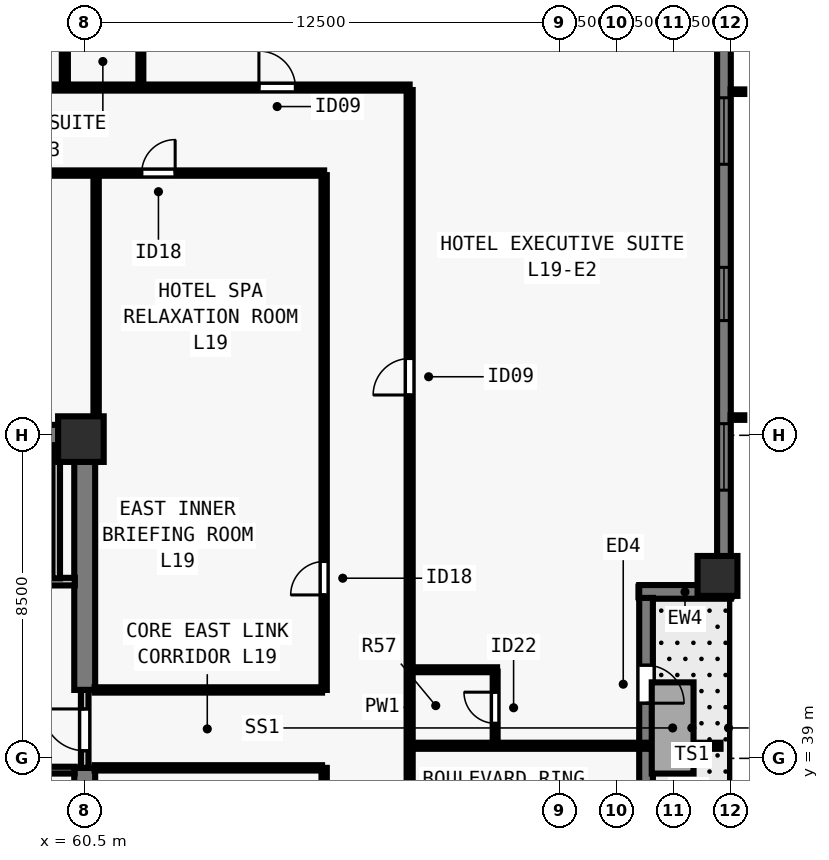
"""IFC4 building model, lengths in metres.
Left out: names, types, materials, properties, quantities, classifications, styles, units other than length and angle.
Written with IfcOpenShell. Run it as: python <this file> out.ifc"""

import sys

from ifc_helpers import new_model, si_unit, direction, frame, frame_2d, origin, origin_2d, place, context, subcontext, project, spatial, rectangle, extrude, element, fill, save


model = new_model("IFC4")
c1 = context("Model", 3, precision=1e-05, world=origin(), true_north=direction((0.0, 1.0)))
c2 = subcontext(c1, "Body", "Model", "MODEL_VIEW")
j1 = project(units=[si_unit("LENGTHUNIT", "METRE"), si_unit("PLANEANGLEUNIT", "RADIAN")], contexts=[c1])
p1 = place(None, origin())
s1 = spatial("IfcSite", under=j1, at=p1, CompositionType="ELEMENT")
p2 = place(p1, origin())
s2 = spatial("IfcBuilding", under=s1, at=p2, CompositionType="ELEMENT")
p3 = place(p2, frame((0.0, 0.0, 72.5)))
s3 = spatial("IfcBuildingStorey", under=s2, at=p3, CompositionType="ELEMENT", Elevation=72.5)
p4 = place(p3, frame((60.4, 47.4, 0.0), z_axis=(0.0, 0.0, 1.0), x_axis=(1.0, 0.0, 0.0)))
e1 = element("IfcColumn", 1, at=p4, inside=s3, PredefinedType="COLUMN", context=c2, shape_type="SweptSolid", body=[
    extrude(rectangle(XDim=1.2, YDim=1.2, at=origin_2d()), origin(), (0.0, 0.0, 1.0), 3.5),
])
p5 = place(p3, frame((77.15, 43.8, 0.0), z_axis=(0.0, 0.0, 1.0), x_axis=(0.0, 1.0, 0.0)))
e2 = element("IfcColumn", 2, at=p5, inside=s3, PredefinedType="COLUMN", context=c2, shape_type="SweptSolid", body=[
    extrude(rectangle(XDim=1.05, YDim=1.05, at=origin_2d()), origin(), (0.0, 0.0, 1.0), 3.5),
])
p6 = place(p3, frame((77.32, 61.5, 0.0), z_axis=(0.0, 0.0, 1.0), x_axis=(0.0, -1.0, 0.0)))
e3 = element("IfcWall", 3, at=p6, inside=s3, PredefinedType="SOLIDWALL", context=c2, shape_type="SweptSolid", body=[
    extrude(rectangle(XDim=17.962, YDim=0.36, at=frame_2d((8.981, 0.0))), origin(), (0.0, 0.0, 1.0), 3.28),
])
p7 = place(p6, frame((5.119, 0.0, 0.8)))
e4 = element("IfcOpeningElement", 4, at=p7, cuts=e3, PredefinedType="OPENING", context=c2, shape_type="SweptSolid", body=[
    extrude(rectangle(XDim=1.75, YDim=1.544, at=frame_2d((0.875, 0.772))), frame((0.0, 0.19, 0.0), z_axis=(0.0, -1.0, 0.0), x_axis=(1.0, 0.0, 0.0)), (0.0, 0.0, 1.0), 0.38),
])
p8 = place(p6, frame((9.581, 0.0, 0.8)))
e5 = element("IfcOpeningElement", 5, at=p8, cuts=e3, PredefinedType="OPENING", context=c2, shape_type="SweptSolid", body=[
    extrude(rectangle(XDim=1.4, YDim=1.544, at=frame_2d((0.7, 0.772))), frame((0.0, 0.19, 0.0), z_axis=(0.0, -1.0, 0.0), x_axis=(1.0, 0.0, 0.0)), (0.0, 0.0, 1.0), 0.38),
])
p9 = place(p6, frame((13.693, 0.0, 0.8)))
e6 = element("IfcOpeningElement", 6, at=p9, cuts=e3, PredefinedType="OPENING", context=c2, shape_type="SweptSolid", body=[
    extrude(rectangle(XDim=1.75, YDim=1.544, at=frame_2d((0.875, 0.772))), frame((0.0, 0.19, 0.0), z_axis=(0.0, -1.0, 0.0), x_axis=(1.0, 0.0, 0.0)), (0.0, 0.0, 1.0), 0.38),
])
p10 = place(p3, frame((77.5, 43.38, 0.0), z_axis=(0.0, 0.0, 1.0), x_axis=(-1.0, 0.0, 0.0)))
e7 = element("IfcWall", 7, at=p10, inside=s3, PredefinedType="SOLIDWALL", context=c2, shape_type="SweptSolid", body=[
    extrude(rectangle(XDim=2.41, YDim=0.36, at=frame_2d((1.205, 0.0))), origin(), (0.0, 0.0, 1.0), 3.28),
])
p11 = place(p3, frame((75.27, 43.222, 0.0), z_axis=(0.0, 0.0, 1.0), x_axis=(0.0, -1.0, 0.0)))
e8 = element("IfcWall", 8, at=p11, inside=s3, PredefinedType="SOLIDWALL", context=c2, shape_type="SweptSolid", body=[
    extrude(rectangle(XDim=7.182, YDim=0.36, at=frame_2d((3.591, 0.0))), origin(), (0.0, 0.0, 1.0), 3.28),
])
p12 = place(p11, frame((1.77, 0.0, 0.0)))
e9 = element("IfcOpeningElement", 9, at=p12, cuts=e8, PredefinedType="OPENING", context=c2, shape_type="SweptSolid", body=[
    extrude(rectangle(XDim=1.0, YDim=2.15, at=frame_2d((0.5, 1.075))), frame((0.0, 0.19, 0.0), z_axis=(0.0, -1.0, 0.0), x_axis=(1.0, 0.0, 0.0)), (0.0, 0.0, 1.0), 0.38),
])
p13 = place(p3, frame((43.225, 47.5, 0.0), z_axis=(0.0, 0.0, 1.0), x_axis=(1.0, 0.0, 0.0)))
e10 = element("IfcWall", 10, at=p13, inside=s3, PredefinedType="SHEAR", context=c2, shape_type="SweptSolid", body=[
    extrude(rectangle(XDim=17.55, YDim=0.55, at=frame_2d((8.775, 0.0))), origin(), (0.0, 0.0, 1.0), 3.28),
])
p14 = place(p3, frame((60.5, 30.765, 0.0), z_axis=(0.0, 0.0, 1.0), x_axis=(0.0, 1.0, 0.0)))
e11 = element("IfcWall", 11, at=p14, inside=s3, PredefinedType="SHEAR", context=c2, shape_type="SweptSolid", body=[
    extrude(rectangle(XDim=7.985, YDim=0.55, at=frame_2d((3.993, 0.0))), origin(), (0.0, 0.0, 1.0), 3.28),
])
p15 = place(p3, frame((60.5, 40.8, 0.0), z_axis=(0.0, 0.0, 1.0), x_axis=(0.0, 1.0, 0.0)))
e12 = element("IfcWall", 12, at=p15, inside=s3, PredefinedType="SHEAR", context=c2, shape_type="SweptSolid", body=[
    extrude(rectangle(XDim=6.435, YDim=0.55, at=frame_2d((3.218, 0.0))), origin(), (0.0, 0.0, 1.0), 3.28),
])
p16 = place(p3, frame((60.5, 38.75, 0.0), z_axis=(0.0, 0.0, 1.0), x_axis=(0.0, 1.0, 0.0)))
e13 = element("IfcWall", 13, at=p16, inside=s3, PredefinedType="SOLIDWALL", context=c2, shape_type="SweptSolid", body=[
    extrude(rectangle(XDim=2.05, YDim=0.2, at=frame_2d((1.025, 0.0))), origin(), (0.0, 0.0, 1.0), 3.28),
])
p17 = place(p16, frame((0.45, 0.0, 0.0)))
e14 = element("IfcOpeningElement", 14, at=p17, cuts=e13, PredefinedType="OPENING", context=c2, shape_type="SweptSolid", body=[
    extrude(rectangle(XDim=1.1, YDim=2.15, at=frame_2d((0.55, 1.075))), frame((0.0, 0.11, 0.0), z_axis=(0.0, -1.0, 0.0), x_axis=(1.0, 0.0, 0.0)), (0.0, 0.0, 1.0), 0.22),
])
p18 = place(p3, frame((56.735, 43.65, 0.0), z_axis=(0.0, 0.0, 1.0), x_axis=(1.0, 0.0, 0.0)))
e15 = element("IfcWall", 15, at=p18, inside=s3, PredefinedType="SOLIDWALL", context=c2, shape_type="SweptSolid", body=[
    extrude(rectangle(XDim=3.505, YDim=0.2, at=frame_2d((1.752, 0.0))), origin(), (0.0, 0.0, 1.0), 3.28),
])
p19 = place(p18, frame((1.295, 0.0, 0.0)))
e16 = element("IfcOpeningElement", 16, at=p19, cuts=e15, PredefinedType="OPENING", context=c2, shape_type="SweptSolid", body=[
    extrude(rectangle(XDim=1.1, YDim=2.2, at=frame_2d((0.55, 1.1))), frame((0.0, 0.11, 0.0), z_axis=(0.0, -1.0, 0.0), x_axis=(1.0, 0.0, 0.0)), (0.0, 0.0, 1.0), 0.22),
])
p20 = place(p3, frame((59.75, 43.735, 0.0), z_axis=(0.0, 0.0, 1.0), x_axis=(0.0, 1.0, 0.0)))
e17 = element("IfcWall", 17, at=p20, inside=s3, PredefinedType="SOLIDWALL", context=c2, shape_type="SweptSolid", body=[
    extrude(rectangle(XDim=3.505, YDim=0.2, at=frame_2d((1.752, 0.0))), origin(), (0.0, 0.0, 1.0), 3.28),
])
p21 = place(p3, frame((34.95, 56.65, 0.0), z_axis=(0.0, 0.0, 1.0), x_axis=(1.0, 0.0, 0.0)))
e18 = element("IfcWall", 18, at=p21, inside=s3, PredefinedType="PARTITIONING", context=c2, shape_type="SweptSolid", body=[
    extrude(rectangle(XDim=34.1, YDim=0.16, at=frame_2d((17.05, 0.0))), origin(), (0.0, 0.0, 1.0), 3.28),
])
p22 = place(p21, frame((4.166, 0.0, 0.0)))
e19 = element("IfcOpeningElement", 19, at=p22, cuts=e18, PredefinedType="OPENING", context=c2, shape_type="SweptSolid", body=[
    extrude(rectangle(XDim=0.96, YDim=2.15, at=frame_2d((0.48, 1.075))), frame((0.0, 0.09, 0.0), z_axis=(0.0, -1.0, 0.0), x_axis=(1.0, 0.0, 0.0)), (0.0, 0.0, 1.0), 0.18),
])
p23 = place(p21, frame((17.73, 0.0, 0.0)))
e20 = element("IfcOpeningElement", 20, at=p23, cuts=e18, PredefinedType="OPENING", context=c2, shape_type="SweptSolid", body=[
    extrude(rectangle(XDim=0.96, YDim=2.15, at=frame_2d((0.48, 1.075))), frame((0.0, 0.09, 0.0), z_axis=(0.0, -1.0, 0.0), x_axis=(1.0, 0.0, 0.0)), (0.0, 0.0, 1.0), 0.18),
])
p24 = place(p21, frame((30.134, 0.0, 0.0)))
e21 = element("IfcOpeningElement", 21, at=p24, cuts=e18, PredefinedType="OPENING", context=c2, shape_type="SweptSolid", body=[
    extrude(rectangle(XDim=0.96, YDim=2.15, at=frame_2d((0.48, 1.075))), frame((0.0, 0.09, 0.0), z_axis=(0.0, -1.0, 0.0), x_axis=(1.0, 0.0, 0.0)), (0.0, 0.0, 1.0), 0.18),
])
p25 = place(p3, frame((69.05, 21.415, 0.0), z_axis=(0.0, 0.0, 1.0), x_axis=(0.0, 1.0, 0.0)))
e22 = element("IfcWall", 22, at=p25, inside=s3, PredefinedType="PARTITIONING", context=c2, shape_type="SweptSolid", body=[
    extrude(rectangle(XDim=35.17, YDim=0.16, at=frame_2d((17.585, 0.0))), origin(), (0.0, 0.0, 1.0), 3.28),
])
p26 = place(p25, frame((9.746, 0.0, 0.0)))
e23 = element("IfcOpeningElement", 23, at=p26, cuts=e22, PredefinedType="OPENING", context=c2, shape_type="SweptSolid", body=[
    extrude(rectangle(XDim=0.96, YDim=2.15, at=frame_2d((0.48, 1.075))), frame((0.0, 0.09, 0.0), z_axis=(0.0, -1.0, 0.0), x_axis=(1.0, 0.0, 0.0)), (0.0, 0.0, 1.0), 0.18),
])
p27 = place(p25, frame((27.146, 0.0, 0.0)))
e24 = element("IfcOpeningElement", 24, at=p27, cuts=e22, PredefinedType="OPENING", context=c2, shape_type="SweptSolid", body=[
    extrude(rectangle(XDim=0.96, YDim=2.15, at=frame_2d((0.48, 1.075))), frame((0.0, 0.09, 0.0), z_axis=(0.0, -1.0, 0.0), x_axis=(1.0, 0.0, 0.0)), (0.0, 0.0, 1.0), 0.18),
])
p28 = place(p3, frame((37.2, 54.4, 0.0), z_axis=(0.0, 0.0, 1.0), x_axis=(1.0, 0.0, 0.0)))
e25 = element("IfcWall", 25, at=p28, inside=s3, PredefinedType="PARTITIONING", context=c2, shape_type="SweptSolid", body=[
    extrude(rectangle(XDim=29.6, YDim=0.14, at=frame_2d((14.8, 0.0))), origin(), (0.0, 0.0, 1.0), 3.28),
])
p29 = place(p28, frame((2.2, 0.0, 0.0)))
e26 = element("IfcOpeningElement", 26, at=p29, cuts=e25, PredefinedType="OPENING", context=c2, shape_type="SweptSolid", body=[
    extrude(rectangle(XDim=0.88, YDim=2.1, at=frame_2d((0.44, 1.05))), frame((0.0, 0.08, 0.0), z_axis=(0.0, -1.0, 0.0), x_axis=(1.0, 0.0, 0.0)), (0.0, 0.0, 1.0), 0.16),
])
p30 = place(p28, frame((15.3, 0.0, 0.0)))
e27 = element("IfcOpeningElement", 27, at=p30, cuts=e25, PredefinedType="OPENING", context=c2, shape_type="SweptSolid", body=[
    extrude(rectangle(XDim=0.88, YDim=2.1, at=frame_2d((0.44, 1.05))), frame((0.0, 0.08, 0.0), z_axis=(0.0, -1.0, 0.0), x_axis=(1.0, 0.0, 0.0)), (0.0, 0.0, 1.0), 0.16),
])
p31 = place(p28, frame((24.8, 0.0, 0.0)))
e28 = element("IfcOpeningElement", 28, at=p31, cuts=e25, PredefinedType="OPENING", context=c2, shape_type="SweptSolid", body=[
    extrude(rectangle(XDim=0.88, YDim=2.1, at=frame_2d((0.44, 1.05))), frame((0.0, 0.08, 0.0), z_axis=(0.0, -1.0, 0.0), x_axis=(1.0, 0.0, 0.0)), (0.0, 0.0, 1.0), 0.16),
])
p32 = place(p3, frame((66.8, 23.655, 0.0), z_axis=(0.0, 0.0, 1.0), x_axis=(0.0, 1.0, 0.0)))
e29 = element("IfcWall", 29, at=p32, inside=s3, PredefinedType="PARTITIONING", context=c2, shape_type="SweptSolid", body=[
    extrude(rectangle(XDim=15.095, YDim=0.14, at=frame_2d((7.547, 0.0))), origin(), (0.0, 0.0, 1.0), 3.28),
])
p33 = place(p32, frame((2.445, 0.0, 0.0)))
e30 = element("IfcOpeningElement", 30, at=p33, cuts=e29, PredefinedType="OPENING", context=c2, shape_type="SweptSolid", body=[
    extrude(rectangle(XDim=0.88, YDim=2.1, at=frame_2d((0.44, 1.05))), frame((0.0, 0.08, 0.0), z_axis=(0.0, -1.0, 0.0), x_axis=(1.0, 0.0, 0.0)), (0.0, 0.0, 1.0), 0.16),
])
p34 = place(p3, frame((66.8, 40.8, 0.0), z_axis=(0.0, 0.0, 1.0), x_axis=(0.0, 1.0, 0.0)))
e31 = element("IfcWall", 31, at=p34, inside=s3, PredefinedType="PARTITIONING", context=c2, shape_type="SweptSolid", body=[
    extrude(rectangle(XDim=13.545, YDim=0.14, at=frame_2d((6.772, 0.0))), origin(), (0.0, 0.0, 1.0), 3.28),
])
p35 = place(p34, frame((2.5, 0.0, 0.0)))
e32 = element("IfcOpeningElement", 32, at=p35, cuts=e31, PredefinedType="OPENING", context=c2, shape_type="SweptSolid", body=[
    extrude(rectangle(XDim=0.88, YDim=2.1, at=frame_2d((0.44, 1.05))), frame((0.0, 0.08, 0.0), z_axis=(0.0, -1.0, 0.0), x_axis=(1.0, 0.0, 0.0)), (0.0, 0.0, 1.0), 0.16),
])
for number, where, z_axis, x_axis in (
    (33, (60.76, 38.75, 0.0), (0.0, 0.0, 1.0), (1.0, 0.0, 0.0)),
    (34, (60.76, 40.8, 0.0), (0.0, 0.0, 1.0), (1.0, 0.0, 0.0)),
):
    element("IfcWall", number, at=place(p3, frame(where, z_axis=z_axis, x_axis=x_axis)), inside=s3, PredefinedType="PARTITIONING", context=c2, shape_type="SweptSolid", body=[
        extrude(rectangle(XDim=5.985, YDim=0.14, at=frame_2d((2.993, 0.0))), origin(), (0.0, 0.0, 1.0), 3.28),
    ])
p36 = place(p3, frame((60.8, 47.76, 0.0), z_axis=(0.0, 0.0, 1.0), x_axis=(0.0, 1.0, 0.0)))
e35 = element("IfcWall", 35, at=p36, inside=s3, PredefinedType="PARTITIONING", context=c2, shape_type="SweptSolid", body=[
    extrude(rectangle(XDim=6.585, YDim=0.14, at=frame_2d((3.292, 0.0))), origin(), (0.0, 0.0, 1.0), 2.439),
])
p37 = place(p3, frame((59.978, 56.715, 0.0), z_axis=(0.0, 0.0, 1.0), x_axis=(0.0, 1.0, 0.0)))
e36 = element("IfcWall", 36, at=p37, inside=s3, PredefinedType="PARTITIONING", context=c2, shape_type="SweptSolid", body=[
    extrude(rectangle(XDim=7.44, YDim=0.16, at=frame_2d((3.72, 0.0))), origin(), (0.0, 0.0, 1.0), 3.28),
])
p38 = place(p3, frame((61.978, 56.715, 0.0), z_axis=(0.0, 0.0, 1.0), x_axis=(0.0, 1.0, 0.0)))
e37 = element("IfcWall", 37, at=p38, inside=s3, PredefinedType="PLUMBINGWALL", context=c2, shape_type="SweptSolid", body=[
    extrude(rectangle(XDim=2.235, YDim=0.13, at=frame_2d((1.117, 0.0))), origin(), (0.0, 0.0, 1.0), 3.28),
])
p39 = place(p3, frame((69.115, 39.332, 0.0), z_axis=(0.0, 0.0, 1.0), x_axis=(1.0, 0.0, 0.0)))
e38 = element("IfcWall", 38, at=p39, inside=s3, PredefinedType="PARTITIONING", context=c2, shape_type="SweptSolid", body=[
    extrude(rectangle(XDim=8.115, YDim=0.16, at=frame_2d((4.058, 0.0))), origin(), (0.0, 0.0, 1.0), 3.28),
])
p40 = place(p3, frame((69.115, 41.332, 0.0), z_axis=(0.0, 0.0, 1.0), x_axis=(1.0, 0.0, 0.0)))
e39 = element("IfcWall", 39, at=p40, inside=s3, PredefinedType="PLUMBINGWALL", context=c2, shape_type="SweptSolid", body=[
    extrude(rectangle(XDim=2.235, YDim=0.13, at=frame_2d((1.118, 0.0))), origin(), (0.0, 0.0, 1.0), 3.28),
])
p41 = place(p3, frame((71.3, 39.396, 0.0), z_axis=(0.0, 0.0, 1.0), x_axis=(0.0, 1.0, 0.0)))
e40 = element("IfcWall", 40, at=p41, inside=s3, PredefinedType="PLUMBINGWALL", context=c2, shape_type="SweptSolid", body=[
    extrude(rectangle(XDim=1.885, YDim=0.13, at=frame_2d((0.942, 0.0))), origin(), (0.0, 0.0, 1.0), 3.28),
])
p42 = place(p41, frame((0.525, 0.0, 0.0)))
e41 = element("IfcOpeningElement", 41, at=p42, cuts=e40, PredefinedType="OPENING", context=c2, shape_type="SweptSolid", body=[
    extrude(rectangle(XDim=0.82, YDim=2.1, at=frame_2d((0.41, 1.05))), frame((0.0, 0.075, 0.0), z_axis=(0.0, -1.0, 0.0), x_axis=(1.0, 0.0, 0.0)), (0.0, 0.0, 1.0), 0.15),
])
p43 = place(p3, frame((57.005, 38.69, 0.0), z_axis=(0.0, 0.0, 1.0), x_axis=(1.0, 0.0, 0.0)))
e42 = element("IfcWall", 42, at=p43, inside=s3, PredefinedType="SOLIDWALL", context=c2, shape_type="SweptSolid", body=[
    extrude(rectangle(XDim=3.23, YDim=0.18, at=frame_2d((1.615, 0.0))), origin(), (0.0, 0.0, 1.0), 3.28),
])
p44 = place(p43, frame((1.14, 0.0, 0.0)))
e43 = element("IfcOpeningElement", 43, at=p44, cuts=e42, PredefinedType="OPENING", context=c2, shape_type="SweptSolid", body=[
    extrude(rectangle(XDim=0.95, YDim=2.15, at=frame_2d((0.475, 1.075))), frame((0.0, 0.1, 0.0), z_axis=(0.0, -1.0, 0.0), x_axis=(1.0, 0.0, 0.0)), (0.0, 0.0, 1.0), 0.2),
])
p45 = place(p7, origin())
e44 = element("IfcWindow", 44, at=p45, inside=s3, PartitioningType="SINGLE_PANEL", PredefinedType="WINDOW", context=c2, shape_type="SweptSolid", body=[
    extrude(rectangle(XDim=1.75, YDim=1.544, at=frame_2d((0.875, 0.772))), frame((0.0, -0.05, 0.0), z_axis=(0.0, -1.0, 0.0), x_axis=(1.0, 0.0, 0.0)), (0.0, 0.0, 1.0), 0.06),
])
fill(e4, e44)
p46 = place(p8, origin())
e45 = element("IfcWindow", 45, at=p46, inside=s3, PartitioningType="SINGLE_PANEL", PredefinedType="WINDOW", context=c2, shape_type="SweptSolid", body=[
    extrude(rectangle(XDim=1.4, YDim=1.544, at=frame_2d((0.7, 0.772))), frame((0.0, -0.05, 0.0), z_axis=(0.0, -1.0, 0.0), x_axis=(1.0, 0.0, 0.0)), (0.0, 0.0, 1.0), 0.06),
])
fill(e5, e45)
p47 = place(p9, origin())
e46 = element("IfcWindow", 46, at=p47, inside=s3, PartitioningType="SINGLE_PANEL", PredefinedType="WINDOW", context=c2, shape_type="SweptSolid", body=[
    extrude(rectangle(XDim=1.75, YDim=1.544, at=frame_2d((0.875, 0.772))), frame((0.0, -0.05, 0.0), z_axis=(0.0, -1.0, 0.0), x_axis=(1.0, 0.0, 0.0)), (0.0, 0.0, 1.0), 0.06),
])
fill(e6, e46)
p48 = place(p12, origin())
e47 = element("IfcDoor", 47, at=p48, inside=s3, OperationType="SINGLE_SWING_RIGHT", PredefinedType="DOOR", context=c2, shape_type="SweptSolid", body=[
    extrude(rectangle(XDim=1.0, YDim=2.15, at=frame_2d((0.5, 1.075))), frame((0.0, 0.025, 0.0), z_axis=(0.0, -1.0, 0.0), x_axis=(1.0, 0.0, 0.0)), (0.0, 0.0, 1.0), 0.05),
])
fill(e9, e47)
p49 = place(p17, origin())
e48 = element("IfcDoor", 48, at=p49, inside=s3, OperationType="SINGLE_SWING_RIGHT", PredefinedType="DOOR", context=c2, shape_type="SweptSolid", body=[
    extrude(rectangle(XDim=1.1, YDim=2.15, at=frame_2d((0.55, 1.075))), frame((0.0, 0.025, 0.0), z_axis=(0.0, -1.0, 0.0), x_axis=(1.0, 0.0, 0.0)), (0.0, 0.0, 1.0), 0.05),
])
fill(e14, e48)
p50 = place(p31, origin())
e49 = element("IfcDoor", 49, at=p50, inside=s3, OperationType="SINGLE_SWING_RIGHT", PredefinedType="DOOR", context=c2, shape_type="SweptSolid", body=[
    extrude(rectangle(XDim=0.88, YDim=2.1, at=frame_2d((0.44, 1.05))), frame((0.0, 0.025, 0.0), z_axis=(0.0, -1.0, 0.0), x_axis=(1.0, 0.0, 0.0)), (0.0, 0.0, 1.0), 0.05),
])
fill(e28, e49)
p51 = place(p35, origin())
e50 = element("IfcDoor", 50, at=p51, inside=s3, OperationType="SINGLE_SWING_LEFT", PredefinedType="DOOR", context=c2, shape_type="SweptSolid", body=[
    extrude(rectangle(XDim=0.88, YDim=2.1, at=frame_2d((0.44, 1.05))), frame((0.0, 0.025, 0.0), z_axis=(0.0, -1.0, 0.0), x_axis=(1.0, 0.0, 0.0)), (0.0, 0.0, 1.0), 0.05),
])
fill(e32, e50)
p52 = place(p24, origin())
e51 = element("IfcDoor", 51, at=p52, inside=s3, OperationType="SINGLE_SWING_LEFT", PredefinedType="DOOR", context=c2, shape_type="SweptSolid", body=[
    extrude(rectangle(XDim=0.96, YDim=2.15, at=frame_2d((0.48, 1.075))), frame((0.0, 0.025, 0.0), z_axis=(0.0, -1.0, 0.0), x_axis=(1.0, 0.0, 0.0)), (0.0, 0.0, 1.0), 0.05),
])
fill(e21, e51)
p53 = place(p42, origin())
e52 = element("IfcDoor", 52, at=p53, inside=s3, OperationType="SINGLE_SWING_RIGHT", PredefinedType="DOOR", context=c2, shape_type="SweptSolid", body=[
    extrude(rectangle(XDim=0.82, YDim=2.1, at=frame_2d((0.41, 1.05))), frame((0.0, 0.025, 0.0), z_axis=(0.0, -1.0, 0.0), x_axis=(1.0, 0.0, 0.0)), (0.0, 0.0, 1.0), 0.05),
])
fill(e41, e52)
p54 = place(p27, origin())
e53 = element("IfcDoor", 53, at=p54, inside=s3, OperationType="SINGLE_SWING_LEFT", PredefinedType="DOOR", context=c2, shape_type="SweptSolid", body=[
    extrude(rectangle(XDim=0.96, YDim=2.15, at=frame_2d((0.48, 1.075))), frame((0.0, 0.025, 0.0), z_axis=(0.0, -1.0, 0.0), x_axis=(1.0, 0.0, 0.0)), (0.0, 0.0, 1.0), 0.05),
])
fill(e24, e53)
save(model, sys.argv[1])
